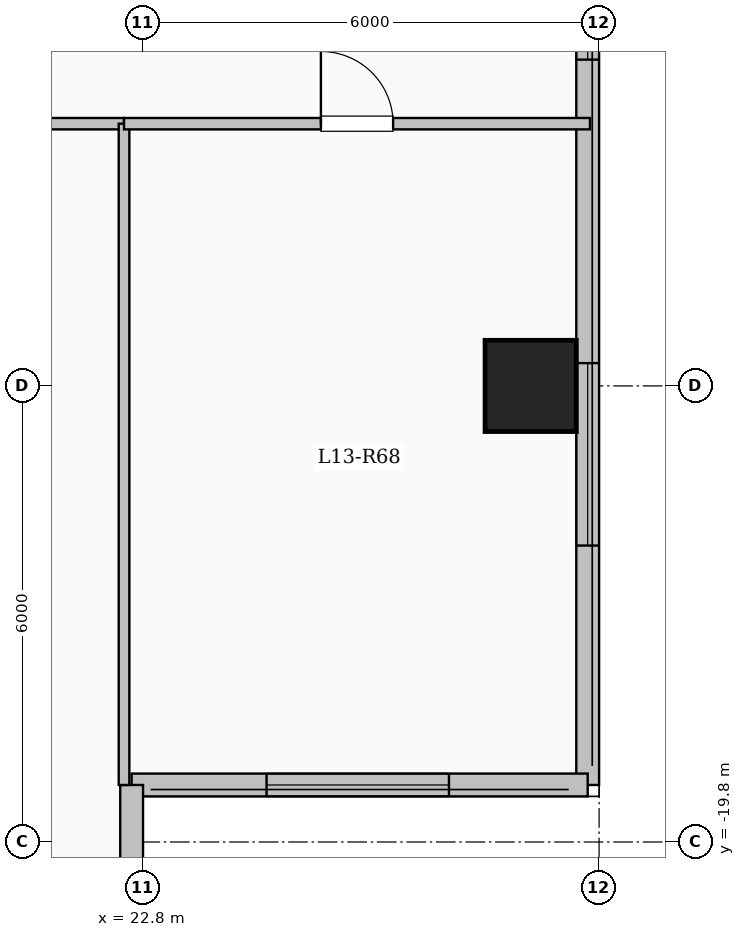
"""IFC4 building model, lengths in metres.
Left out: names, types, materials, properties, quantities, classifications, styles, units other than length and angle.
Written with IfcOpenShell. Run it as: python <this file> out.ifc"""

import sys

from ifc_helpers import new_model, si_unit, direction, frame, frame_2d, origin, origin_2d, place, context, subcontext, project, spatial, rectangle, extrude, element, fill, save


model = new_model("IFC4")
c1 = context("Model", 3, precision=1e-05, world=origin(), true_north=direction((0.0, 1.0)))
c2 = subcontext(c1, "Body", "Model", "MODEL_VIEW")
j1 = project(units=[si_unit("LENGTHUNIT", "METRE"), si_unit("PLANEANGLEUNIT", "RADIAN")], contexts=[c1])
p1 = place(None, origin())
s1 = spatial("IfcSite", under=j1, at=p1, CompositionType="ELEMENT")
p2 = place(p1, origin())
s2 = spatial("IfcBuilding", under=s1, at=p2, CompositionType="ELEMENT")
p3 = place(p2, frame((0.0, 0.0, 50.8)))
s3 = spatial("IfcBuildingStorey", under=s2, at=p3, CompositionType="ELEMENT", Elevation=50.8)
p4 = place(p3, frame((27.9, -13.8, 0.0), z_axis=(0.0, 0.0, 1.0), x_axis=(1.0, 0.0, 0.0)))
e1 = element("IfcColumn", 1, at=p4, inside=s3, PredefinedType="COLUMN", context=c2, shape_type="SweptSolid", body=[
    extrude(rectangle(XDim=1.2, YDim=1.2, at=origin_2d()), origin(), (0.0, 0.0, 1.0), 3.35),
])
p5 = place(p3, frame((28.65, 19.05, 0.0), z_axis=(0.0, 0.0, 1.0), x_axis=(0.0, -1.0, 0.0)))
e2 = element("IfcWall", 2, at=p5, inside=s3, PredefinedType="SOLIDWALL", context=c2, shape_type="SweptSolid", body=[
    extrude(rectangle(XDim=38.1, YDim=0.3, at=frame_2d((19.05, 0.0))), origin(), (0.0, 0.0, 1.0), 3.1),
])
p6 = place(p5, frame((2.275, 0.0, 0.9)))
e3 = element("IfcOpeningElement", 3, at=p6, cuts=e2, PredefinedType="OPENING", context=c2, shape_type="SweptSolid", body=[
    extrude(rectangle(XDim=2.0, YDim=1.7, at=frame_2d((1.0, 0.85))), frame((0.0, 0.16, 0.0), z_axis=(0.0, -1.0, 0.0), x_axis=(1.0, 0.0, 0.0)), (0.0, 0.0, 1.0), 0.32),
])
p7 = place(p5, frame((6.925, 0.0, 0.95)))
e4 = element("IfcOpeningElement", 4, at=p7, cuts=e2, PredefinedType="OPENING", context=c2, shape_type="SweptSolid", body=[
    extrude(rectangle(XDim=1.0, YDim=1.5, at=frame_2d((0.5, 0.75))), frame((0.0, 0.16, 0.0), z_axis=(0.0, -1.0, 0.0), x_axis=(1.0, 0.0, 0.0)), (0.0, 0.0, 1.0), 0.32),
])
p8 = place(p5, frame((16.3, 0.0, 0.9)))
e5 = element("IfcOpeningElement", 5, at=p8, cuts=e2, PredefinedType="OPENING", context=c2, shape_type="SweptSolid", body=[
    extrude(rectangle(XDim=2.0, YDim=1.7, at=frame_2d((1.0, 0.85))), frame((0.0, 0.16, 0.0), z_axis=(0.0, -1.0, 0.0), x_axis=(1.0, 0.0, 0.0)), (0.0, 0.0, 1.0), 0.32),
])
p9 = place(p5, frame((27.058, 0.0, 0.9)))
e6 = element("IfcOpeningElement", 6, at=p9, cuts=e2, PredefinedType="OPENING", context=c2, shape_type="SweptSolid", body=[
    extrude(rectangle(XDim=1.5, YDim=1.65, at=frame_2d((0.75, 0.825))), frame((0.0, 0.16, 0.0), z_axis=(0.0, -1.0, 0.0), x_axis=(1.0, 0.0, 0.0)), (0.0, 0.0, 1.0), 0.32),
])
p10 = place(p5, frame((32.55, 0.0, 0.9)))
e7 = element("IfcOpeningElement", 7, at=p10, cuts=e2, PredefinedType="OPENING", context=c2, shape_type="SweptSolid", body=[
    extrude(rectangle(XDim=2.4, YDim=1.8, at=frame_2d((1.2, 0.9))), frame((0.0, 0.16, 0.0), z_axis=(0.0, -1.0, 0.0), x_axis=(1.0, 0.0, 0.0)), (0.0, 0.0, 1.0), 0.32),
])
p11 = place(p3, frame((28.65, -19.05, 0.0), z_axis=(0.0, 0.0, 1.0), x_axis=(-1.0, 0.0, 0.0)))
e8 = element("IfcWall", 8, at=p11, inside=s3, PredefinedType="SOLIDWALL", context=c2, shape_type="SweptSolid", body=[
    extrude(rectangle(XDim=6.0, YDim=0.3, at=frame_2d((3.0, 0.0))), origin(), (0.0, 0.0, 1.0), 3.1),
])
p12 = place(p11, frame((1.825, 0.0, 0.9)))
e9 = element("IfcOpeningElement", 9, at=p12, cuts=e8, PredefinedType="OPENING", context=c2, shape_type="SweptSolid", body=[
    extrude(rectangle(XDim=2.4, YDim=1.8, at=frame_2d((1.2, 0.9))), frame((0.0, 0.16, 0.0), z_axis=(0.0, -1.0, 0.0), x_axis=(1.0, 0.0, 0.0)), (0.0, 0.0, 1.0), 0.32),
])
p13 = place(p3, frame((22.65, -19.05, 0.0), z_axis=(0.0, 0.0, 1.0), x_axis=(0.0, -1.0, 0.0)))
e10 = element("IfcWall", 10, at=p13, inside=s3, PredefinedType="SOLIDWALL", context=c2, shape_type="SweptSolid", body=[
    extrude(rectangle(XDim=4.5, YDim=0.3, at=frame_2d((2.25, 0.0))), origin(), (0.0, 0.0, 1.0), 3.1),
])
p14 = place(p13, frame((1.232, 0.0, 0.9)))
e11 = element("IfcOpeningElement", 11, at=p14, cuts=e10, PredefinedType="OPENING", context=c2, shape_type="SweptSolid", body=[
    extrude(rectangle(XDim=2.0, YDim=1.7, at=frame_2d((1.0, 0.85))), frame((0.0, 0.16, 0.0), z_axis=(0.0, -1.0, 0.0), x_axis=(1.0, 0.0, 0.0)), (0.0, 0.0, 1.0), 0.32),
])
p15 = place(p3, frame((8.55, -10.35, 0.0), z_axis=(0.0, 0.0, 1.0), x_axis=(1.0, 0.0, 0.0)))
e12 = element("IfcWall", 12, at=p15, inside=s3, PredefinedType="PARTITIONING", context=c2, shape_type="SweptSolid", body=[
    extrude(rectangle(XDim=14.0, YDim=0.15, at=frame_2d((7.0, 0.0))), origin(), (0.0, 0.0, 1.0), 3.1),
])
p16 = place(p15, frame((2.056, 0.0, 0.0)))
e13 = element("IfcOpeningElement", 13, at=p16, cuts=e12, PredefinedType="OPENING", context=c2, shape_type="SweptSolid", body=[
    extrude(rectangle(XDim=0.95, YDim=2.15, at=frame_2d((0.475, 1.075))), frame((0.0, 0.085, 0.0), z_axis=(0.0, -1.0, 0.0), x_axis=(1.0, 0.0, 0.0)), (0.0, 0.0, 1.0), 0.17),
])
p17 = place(p15, frame((7.108, 0.0, 0.0)))
e14 = element("IfcOpeningElement", 14, at=p17, cuts=e12, PredefinedType="OPENING", context=c2, shape_type="SweptSolid", body=[
    extrude(rectangle(XDim=0.95, YDim=2.15, at=frame_2d((0.475, 1.075))), frame((0.0, 0.085, 0.0), z_axis=(0.0, -1.0, 0.0), x_axis=(1.0, 0.0, 0.0)), (0.0, 0.0, 1.0), 0.17),
])
p18 = place(p15, frame((11.602, 0.0, 0.0)))
e15 = element("IfcOpeningElement", 15, at=p18, cuts=e12, PredefinedType="OPENING", context=c2, shape_type="SweptSolid", body=[
    extrude(rectangle(XDim=0.95, YDim=2.15, at=frame_2d((0.475, 1.075))), frame((0.0, 0.085, 0.0), z_axis=(0.0, -1.0, 0.0), x_axis=(1.0, 0.0, 0.0)), (0.0, 0.0, 1.0), 0.17),
])
p19 = place(p3, frame((22.55, -19.05, 0.0), z_axis=(0.0, 0.0, 1.0), x_axis=(0.0, 1.0, 0.0)))
e16 = element("IfcWall", 16, at=p19, inside=s3, PredefinedType="PARTITIONING", context=c2, shape_type="SweptSolid", body=[
    extrude(rectangle(XDim=8.7, YDim=0.14, at=frame_2d((4.35, 0.0))), origin(), (0.0, 0.0, 1.0), 3.1),
])
p20 = place(p3, frame((22.55, -10.35, 0.0), z_axis=(0.0, 0.0, 1.0), x_axis=(1.0, 0.0, 0.0)))
e17 = element("IfcWall", 17, at=p20, inside=s3, PredefinedType="PARTITIONING", context=c2, shape_type="SweptSolid", body=[
    extrude(rectangle(XDim=6.13, YDim=0.15, at=frame_2d((3.065, 0.0))), origin(), (0.0, 0.0, 1.0), 3.1),
])
p21 = place(p20, frame((2.59, 0.0, 0.0)))
e18 = element("IfcOpeningElement", 18, at=p21, cuts=e17, PredefinedType="OPENING", context=c2, shape_type="SweptSolid", body=[
    extrude(rectangle(XDim=0.95, YDim=2.15, at=frame_2d((0.475, 1.075))), frame((0.0, 0.085, 0.0), z_axis=(0.0, -1.0, 0.0), x_axis=(1.0, 0.0, 0.0)), (0.0, 0.0, 1.0), 0.17),
])
p22 = place(p9, origin())
e19 = element("IfcWindow", 19, at=p22, inside=s3, PartitioningType="SINGLE_PANEL", PredefinedType="WINDOW", context=c2, shape_type="SweptSolid", body=[
    extrude(rectangle(XDim=1.5, YDim=1.65, at=frame_2d((0.75, 0.825))), frame((0.0, 0.03, 0.0), z_axis=(0.0, -1.0, 0.0), x_axis=(1.0, 0.0, 0.0)), (0.0, 0.0, 1.0), 0.06),
])
fill(e6, e19)
p23 = place(p10, origin())
e20 = element("IfcWindow", 20, at=p23, inside=s3, PartitioningType="SINGLE_PANEL", PredefinedType="WINDOW", context=c2, shape_type="SweptSolid", body=[
    extrude(rectangle(XDim=2.4, YDim=1.8, at=frame_2d((1.2, 0.9))), frame((0.0, 0.03, 0.0), z_axis=(0.0, -1.0, 0.0), x_axis=(1.0, 0.0, 0.0)), (0.0, 0.0, 1.0), 0.06),
])
fill(e7, e20)
p24 = place(p12, origin())
e21 = element("IfcWindow", 21, at=p24, inside=s3, PartitioningType="SINGLE_PANEL", PredefinedType="WINDOW", context=c2, shape_type="SweptSolid", body=[
    extrude(rectangle(XDim=2.4, YDim=1.8, at=frame_2d((1.2, 0.9))), frame((0.0, 0.03, 0.0), z_axis=(0.0, -1.0, 0.0), x_axis=(1.0, 0.0, 0.0)), (0.0, 0.0, 1.0), 0.06),
])
fill(e9, e21)
p25 = place(p21, origin())
e22 = element("IfcDoor", 22, at=p25, inside=s3, OperationType="SINGLE_SWING_LEFT", PredefinedType="DOOR", context=c2, shape_type="SweptSolid", body=[
    extrude(rectangle(XDim=0.95, YDim=2.15, at=frame_2d((0.475, 1.075))), frame((0.0, 0.025, 0.0), z_axis=(0.0, -1.0, 0.0), x_axis=(1.0, 0.0, 0.0)), (0.0, 0.0, 1.0), 0.05),
])
fill(e18, e22)
save(model, sys.argv[1])
